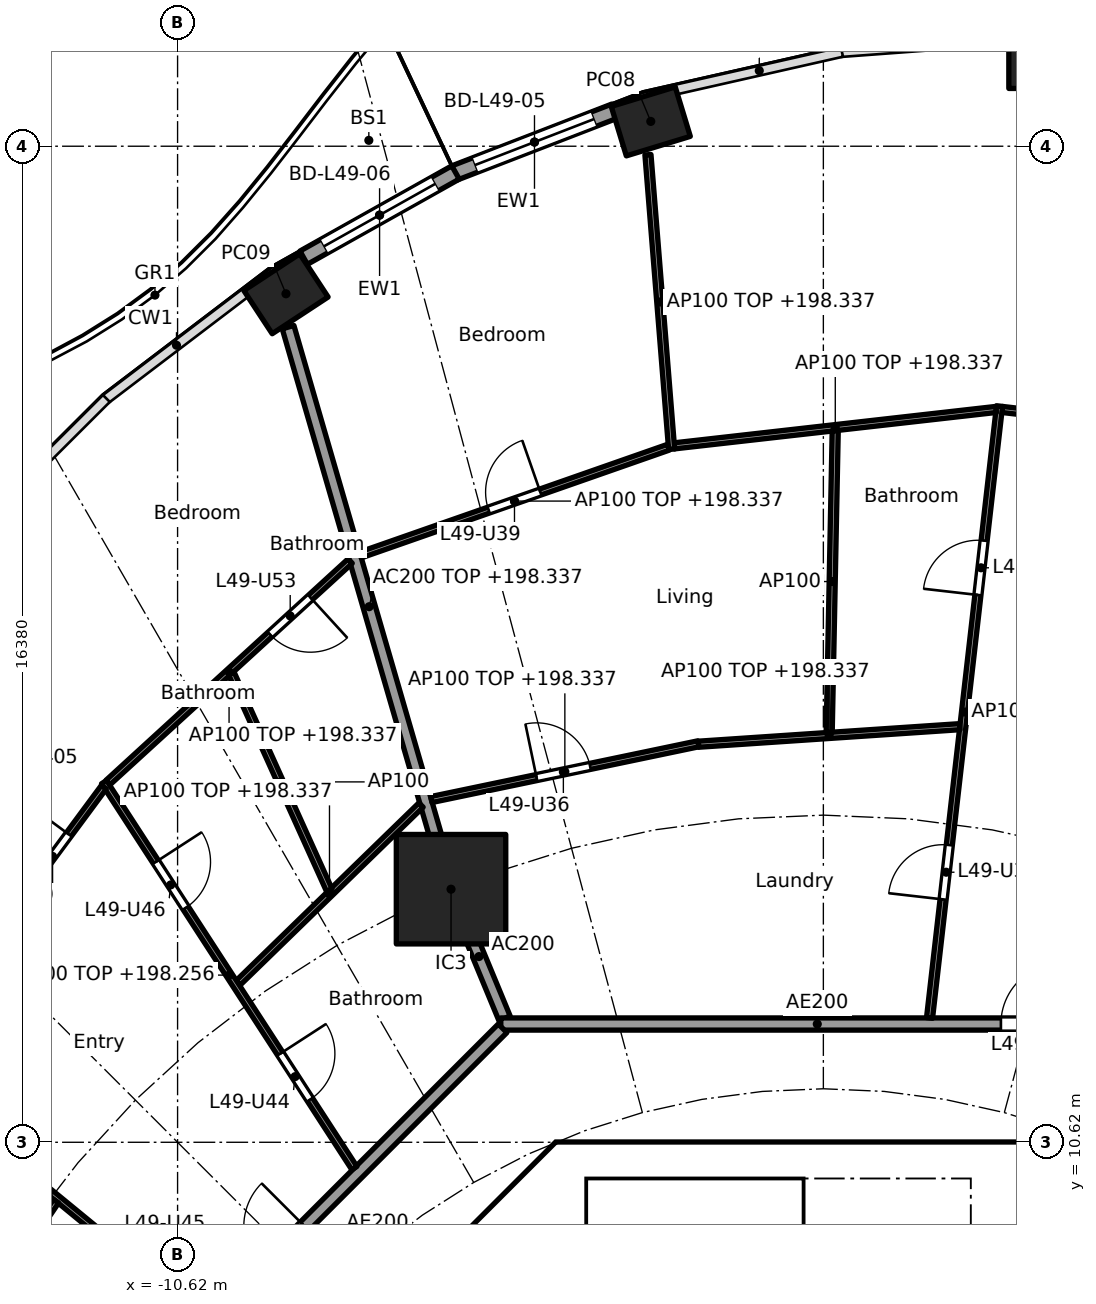
"""IFC4 building model, lengths in metres.
Left out: names, types, materials, properties, quantities, classifications, styles, units other than length and angle.
Written with IfcOpenShell. Run it as: python <this file> out.ifc"""

import sys

from ifc_helpers import new_model, si_unit, direction, frame, frame_2d, origin, origin_2d, place, context, subcontext, project, spatial, polyline, rectangle, hollow_rectangle, outline, extrude, element, fill, save


model = new_model("IFC4")
c1 = context("Model", 3, precision=1e-05, world=origin(), true_north=direction((0.0, 1.0)))
c2 = subcontext(c1, "Body", "Model", "MODEL_VIEW")
j1 = project(units=[si_unit("LENGTHUNIT", "METRE"), si_unit("PLANEANGLEUNIT", "RADIAN")], contexts=[c1])
p1 = place(None, origin())
s1 = spatial("IfcSite", under=j1, at=p1, CompositionType="ELEMENT")
p2 = place(p1, origin())
s2 = spatial("IfcBuilding", under=s1, at=p2, CompositionType="ELEMENT")
p3 = place(p2, frame((0.0, 0.0, 195.5)))
s3 = spatial("IfcBuildingStorey", under=s2, at=p3, CompositionType="ELEMENT", Elevation=195.5)
for number, where, z_axis, x_axis in (
    (1, (3.6, 28.375, 0.0), (0.0, 0.0, 1.0), (-1.0, 0.0, 0.0)),
    (2, (-2.838, 27.408, 0.0), (0.0, 0.0, 1.0), (-0.957, -0.292, 0.0)),
    (3, (-8.837, 24.573, 0.0), (0.0, 0.0, 1.0), (-0.836, -0.549, 0.0)),
):
    element("IfcColumn", number, at=place(p3, frame(where, z_axis=z_axis, x_axis=x_axis)), inside=s3, PredefinedType="COLUMN", context=c2, shape_type="SweptSolid", body=[
        extrude(hollow_rectangle(XDim=1.1, YDim=0.85, WallThickness=0.036, at=origin_2d()), origin(), (0.0, 0.0, 1.0), 3.7),
    ])
p4 = place(p3, frame((-6.123, 14.782, 0.0), z_axis=(0.0, 0.0, 1.0), x_axis=(1.0, 0.0, 0.0)))
e4 = element("IfcColumn", 4, at=p4, inside=s3, PredefinedType="COLUMN", context=c2, shape_type="SweptSolid", body=[
    extrude(rectangle(XDim=1.8, YDim=1.8, at=origin_2d()), origin(), (0.0, 0.0, 1.0), 3.7),
])
p5 = place(p3, frame((-6.065, 26.56, 0.0), z_axis=(0.0, 0.0, 1.0), x_axis=(0.932795487898, 0.360406128911, 0.0)))
e5 = element("IfcWall", 5, at=p5, inside=s3, PredefinedType="SOLIDWALL", context=c2, shape_type="SweptSolid", body=[
    extrude(rectangle(XDim=2.819, YDim=0.25, at=frame_2d((1.41, 0.0))), origin(), (0.0, 0.0, 1.0), 3.44),
])
p6 = place(p5, frame((0.36, 0.0, 0.0)))
e6 = element("IfcOpeningElement", 6, at=p6, cuts=e5, PredefinedType="OPENING", context=c2, shape_type="SweptSolid", body=[
    extrude(rectangle(XDim=2.1, YDim=2.4, at=frame_2d((1.05, 1.2))), frame((0.0, 0.135, 0.0), z_axis=(0.0, -1.0, 0.0), x_axis=(1.0, 0.0, 0.0)), (0.0, 0.0, 1.0), 0.27),
])
p7 = place(p3, frame((-8.547, 25.167, 0.0), z_axis=(0.0, 0.0, 1.0), x_axis=(0.872078262455, 0.489366431371, 0.0)))
e7 = element("IfcWall", 7, at=p7, inside=s3, PredefinedType="SOLIDWALL", context=c2, shape_type="SweptSolid", body=[
    extrude(rectangle(XDim=2.864, YDim=0.25, at=frame_2d((1.432, 0.0))), origin(), (0.0, 0.0, 1.0), 3.44),
])
p8 = place(p7, frame((0.382, 0.0, 0.0)))
e8 = element("IfcOpeningElement", 8, at=p8, cuts=e7, PredefinedType="OPENING", context=c2, shape_type="SweptSolid", body=[
    extrude(rectangle(XDim=2.1, YDim=2.4, at=frame_2d((1.05, 1.2))), frame((0.0, 0.135, 0.0), z_axis=(0.0, -1.0, 0.0), x_axis=(1.0, 0.0, 0.0)), (0.0, 0.0, 1.0), 0.27),
])
p9 = place(p3, frame((-4.613, 9.988, 0.0), z_axis=(0.0, 0.0, 1.0), x_axis=(-0.707106781187, -0.707106781187, 0.0)))
e9 = element("IfcWall", 9, at=p9, inside=s3, PredefinedType="SHEAR", context=c2, shape_type="SweptSolid", body=[
    extrude(rectangle(XDim=7.602, YDim=0.6, at=frame_2d((3.801, 0.0))), origin(), (0.0, 0.0, 1.0), 3.44),
])
p10 = place(p9, frame((0.351, 0.0, 0.0)))
e10 = element("IfcOpeningElement", 10, at=p10, cuts=e9, PredefinedType="OPENING", context=c2, shape_type="SweptSolid", body=[
    extrude(rectangle(XDim=1.1, YDim=2.1, at=frame_2d((0.55, 1.05))), frame((0.0, 0.31, 0.0), z_axis=(0.0, -1.0, 0.0), x_axis=(1.0, 0.0, 0.0)), (0.0, 0.0, 1.0), 0.62),
])
p11 = place(p3, origin())
e11 = element("IfcWall", 11, at=p11, inside=s3, PredefinedType="SHEAR", context=c2, shape_type="SweptSolid", body=[
    extrude(outline(polyline([(-4.152, 10.025), (-4.401, 9.776), (-4.825, 10.2), (-4.401, 10.625), (4.401, 10.625), (4.825, 10.2), (4.401, 9.776), (4.152, 10.025), (-4.152, 10.025)])), origin(), (0.0, 0.0, 1.0), 3.44),
])
p12 = place(p3, origin())
e12 = element("IfcWall", 12, at=p12, inside=s3, PredefinedType="SOLIDWALL", context=c2, shape_type="SweptSolid", body=[
    extrude(outline(polyline([(-3.9, 7.025), (-4.1, 7.025), (-4.1, 10.025), (-3.9, 10.025), (-3.9, 7.025)])), origin(), (0.0, 0.0, 1.0), 3.44),
])
p13 = place(p3, frame((-5.243, 12.657, 0.0), z_axis=(0.0, 0.0, 1.0), x_axis=(-0.382707856524, 0.923869415315, 0.0)))
e13 = element("IfcWall", 13, at=p13, inside=s3, PredefinedType="PARTITIONING", context=c2, shape_type="SweptSolid", body=[
    extrude(rectangle(XDim=2.2, YDim=0.2, at=frame_2d((1.1, 0.0))), origin(), (0.0, 0.0, 1.0), 3.44),
])
p14 = place(p3, frame((-6.137, 14.83, 0.0), z_axis=(0.0, 0.0, 1.0), x_axis=(-0.278461169897, 0.96044748782, 0.0)))
e14 = element("IfcWall", 14, at=p14, inside=s3, PredefinedType="PARTITIONING", context=c2, shape_type="SweptSolid", body=[
    extrude(rectangle(XDim=9.573, YDim=0.2, at=frame_2d((4.787, 0.0))), origin(), (0.0, 0.0, 1.0), 2.837),
])
p15 = place(p3, frame((5.104, 12.565, 0.0), z_axis=(0.0, 0.0, 1.0), x_axis=(-1.0, 0.0, 0.0)))
e15 = element("IfcWall", 15, at=p15, inside=s3, PredefinedType="PARTITIONING", context=c2, shape_type="SweptSolid", body=[
    extrude(rectangle(XDim=10.409, YDim=0.2, at=frame_2d((5.205, 0.0))), origin(), (0.0, 0.0, 1.0), 3.44),
])
p16 = place(p15, frame((1.185, 0.0, 0.0)))
e16 = element("IfcOpeningElement", 16, at=p16, cuts=e15, PredefinedType="OPENING", context=c2, shape_type="SweptSolid", body=[
    extrude(rectangle(XDim=1.0, YDim=2.1, at=frame_2d((0.5, 1.05))), frame((0.0, 0.11, 0.0), z_axis=(0.0, -1.0, 0.0), x_axis=(1.0, 0.0, 0.0)), (0.0, 0.0, 1.0), 0.22),
])
p17 = place(p3, frame((-5.275, 12.494, 0.0), z_axis=(0.0, 0.0, 1.0), x_axis=(-0.707106781187, -0.707106781187, 0.0)))
e17 = element("IfcWall", 17, at=p17, inside=s3, PredefinedType="PARTITIONING", context=c2, shape_type="SweptSolid", body=[
    extrude(rectangle(XDim=10.209, YDim=0.2, at=frame_2d((5.104, 0.0))), origin(), (0.0, 0.0, 1.0), 3.44),
])
p18 = place(p17, frame((4.604, 0.0, 0.0)))
e18 = element("IfcOpeningElement", 18, at=p18, cuts=e17, PredefinedType="OPENING", context=c2, shape_type="SweptSolid", body=[
    extrude(rectangle(XDim=1.0, YDim=2.1, at=frame_2d((0.5, 1.05))), frame((0.0, 0.11, 0.0), z_axis=(0.0, -1.0, 0.0), x_axis=(1.0, 0.0, 0.0)), (0.0, 0.0, 1.0), 0.22),
])
p19 = place(p3, frame((8.312, 22.044, 0.0), z_axis=(0.0, 0.0, 1.0), x_axis=(-0.993245806382, 0.1160291692, 0.0)))
e19 = element("IfcWall", 19, at=p19, inside=s3, PredefinedType="PARTITIONING", context=c2, shape_type="SweptSolid", body=[
    extrude(rectangle(XDim=5.408, YDim=0.1, at=frame_2d((2.704, 0.0))), origin(), (0.0, 0.0, 1.0), 2.837),
])
p20 = place(p19, frame((2.254, 0.0, 0.0)))
e20 = element("IfcOpeningElement", 20, at=p20, cuts=e19, PredefinedType="OPENING", context=c2, shape_type="SweptSolid", body=[
    extrude(rectangle(XDim=0.9, YDim=2.1, at=frame_2d((0.45, 1.05))), frame((0.0, 0.06, 0.0), z_axis=(0.0, -1.0, 0.0), x_axis=(1.0, 0.0, 0.0)), (0.0, 0.0, 1.0), 0.12),
])
p21 = place(p3, frame((1.746, 12.664, 0.0), z_axis=(0.0, 0.0, 1.0), x_axis=(0.113629529561, 0.993523190475, 0.0)))
e21 = element("IfcWall", 21, at=p21, inside=s3, PredefinedType="PARTITIONING", context=c2, shape_type="SweptSolid", body=[
    extrude(rectangle(XDim=10.128, YDim=0.1, at=frame_2d((5.064, 0.0))), origin(), (0.0, 0.0, 1.0), 2.756),
])
p22 = place(p21, frame((1.962, 0.0, 0.0)))
e22 = element("IfcOpeningElement", 22, at=p22, cuts=e21, PredefinedType="OPENING", context=c2, shape_type="SweptSolid", body=[
    extrude(rectangle(XDim=0.9, YDim=2.1, at=frame_2d((0.45, 1.05))), frame((0.0, 0.06, 0.0), z_axis=(0.0, -1.0, 0.0), x_axis=(1.0, 0.0, 0.0)), (0.0, 0.0, 1.0), 0.12),
])
p23 = place(p21, frame((7.002, 0.0, 0.0)))
e23 = element("IfcOpeningElement", 23, at=p23, cuts=e21, PredefinedType="OPENING", context=c2, shape_type="SweptSolid", body=[
    extrude(rectangle(XDim=0.9, YDim=2.1, at=frame_2d((0.45, 1.05))), frame((0.0, 0.06, 0.0), z_axis=(0.0, -1.0, 0.0), x_axis=(1.0, 0.0, 0.0)), (0.0, 0.0, 1.0), 0.12),
])
p24 = place(p3, frame((2.244, 17.455, 0.0), z_axis=(0.0, 0.0, 1.0), x_axis=(-0.997754717554, -0.066974051687, 0.0)))
e24 = element("IfcWall", 24, at=p24, inside=s3, PredefinedType="PARTITIONING", context=c2, shape_type="SweptSolid", body=[
    extrude(rectangle(XDim=4.309, YDim=0.1, at=frame_2d((2.154, 0.0))), origin(), (0.0, 0.0, 1.0), 2.837),
])
p25 = place(p3, frame((2.842, 22.671, 0.0), z_axis=(0.0, 0.0, 1.0), x_axis=(-0.993660315081, -0.112424099879, 0.0)))
e25 = element("IfcWall", 25, at=p25, inside=s3, PredefinedType="PARTITIONING", context=c2, shape_type="SweptSolid", body=[
    extrude(rectangle(XDim=5.325, YDim=0.1, at=frame_2d((2.662, 0.0))), origin(), (0.0, 0.0, 1.0), 2.837),
])
p26 = place(p3, frame((0.096, 17.36, 0.0), z_axis=(0.0, 0.0, 1.0), x_axis=(0.019973380305, 0.999800512142, 0.0)))
e26 = element("IfcWall", 26, at=p26, inside=s3, PredefinedType="PARTITIONING", context=c2, shape_type="SweptSolid", body=[
    extrude(rectangle(XDim=4.963, YDim=0.1, at=frame_2d((2.481, 0.0))), origin(), (0.0, 0.0, 1.0), 3.44),
])
p27 = place(p3, frame((-2.056, 17.173, 0.0), z_axis=(0.0, 0.0, 1.0), x_axis=(-0.978902917122, -0.20432591331, 0.0)))
e27 = element("IfcWall", 27, at=p27, inside=s3, PredefinedType="PARTITIONING", context=c2, shape_type="SweptSolid", body=[
    extrude(rectangle(XDim=4.486, YDim=0.1, at=frame_2d((2.243, 0.0))), origin(), (0.0, 0.0, 1.0), 2.837),
])
p28 = place(p27, frame((1.818, 0.0, 0.0)))
e28 = element("IfcOpeningElement", 28, at=p28, cuts=e27, PredefinedType="OPENING", context=c2, shape_type="SweptSolid", body=[
    extrude(rectangle(XDim=0.9, YDim=2.1, at=frame_2d((0.45, 1.05))), frame((0.0, 0.06, 0.0), z_axis=(0.0, -1.0, 0.0), x_axis=(1.0, 0.0, 0.0)), (0.0, 0.0, 1.0), 0.12),
])
p29 = place(p3, frame((-2.495, 22.017, 0.0), z_axis=(0.0, 0.0, 1.0), x_axis=(-0.080150660566, 0.99678276049, 0.0)))
e29 = element("IfcWall", 29, at=p29, inside=s3, PredefinedType="PARTITIONING", context=c2, shape_type="SweptSolid", body=[
    extrude(rectangle(XDim=4.858, YDim=0.1, at=frame_2d((2.429, 0.0))), origin(), (0.0, 0.0, 1.0), 2.837),
])
p30 = place(p3, frame((-2.546, 22.051, 0.0), z_axis=(0.0, 0.0, 1.0), x_axis=(-0.94391294884, -0.330194404878, 0.0)))
e30 = element("IfcWall", 30, at=p30, inside=s3, PredefinedType="PARTITIONING", context=c2, shape_type="SweptSolid", body=[
    extrude(rectangle(XDim=5.367, YDim=0.1, at=frame_2d((2.684, 0.0))), origin(), (0.0, 0.0, 1.0), 2.837),
])
p31 = place(p30, frame((2.234, 0.0, 0.0)))
e31 = element("IfcOpeningElement", 31, at=p31, cuts=e30, PredefinedType="OPENING", context=c2, shape_type="SweptSolid", body=[
    extrude(rectangle(XDim=0.9, YDim=2.1, at=frame_2d((0.45, 1.05))), frame((0.0, 0.06, 0.0), z_axis=(0.0, -1.0, 0.0), x_axis=(1.0, 0.0, 0.0)), (0.0, 0.0, 1.0), 0.12),
])
p32 = place(p3, frame((-6.616, 16.166, 0.0), z_axis=(0.0, 0.0, 1.0), x_axis=(-0.716919058692, -0.697156412352, 0.0)))
e32 = element("IfcWall", 32, at=p32, inside=s3, PredefinedType="PARTITIONING", context=c2, shape_type="SweptSolid", body=[
    extrude(rectangle(XDim=4.2, YDim=0.1, at=frame_2d((2.1, 0.0))), origin(), (0.0, 0.0, 1.0), 2.837),
])
p33 = place(p3, frame((-7.781, 20.178, 0.0), z_axis=(0.0, 0.0, 1.0), x_axis=(-0.73807320557, -0.674720640872, 0.0)))
e33 = element("IfcWall", 33, at=p33, inside=s3, PredefinedType="PARTITIONING", context=c2, shape_type="SweptSolid", body=[
    extrude(rectangle(XDim=5.399, YDim=0.1, at=frame_2d((2.699, 0.0))), origin(), (0.0, 0.0, 1.0), 2.837),
])
p34 = place(p33, frame((0.887, 0.0, 0.0)))
e34 = element("IfcOpeningElement", 34, at=p34, cuts=e33, PredefinedType="OPENING", context=c2, shape_type="SweptSolid", body=[
    extrude(rectangle(XDim=0.9, YDim=2.1, at=frame_2d((0.45, 1.05))), frame((0.0, 0.06, 0.0), z_axis=(0.0, -1.0, 0.0), x_axis=(1.0, 0.0, 0.0)), (0.0, 0.0, 1.0), 0.12),
])
p35 = place(p3, frame((-8.125, 14.765, 0.0), z_axis=(0.0, 0.0, 1.0), x_axis=(-0.411745679848, 0.911298795745, 0.0)))
e35 = element("IfcWall", 35, at=p35, inside=s3, PredefinedType="PARTITIONING", context=c2, shape_type="SweptSolid", body=[
    extrude(rectangle(XDim=3.909, YDim=0.1, at=frame_2d((1.955, 0.0))), origin(), (0.0, 0.0, 1.0), 3.44),
])
p36 = place(p3, frame((-7.712, 10.195, 0.0), z_axis=(0.0, 0.0, 1.0), x_axis=(-0.544179442551, 0.838968851809, 0.0)))
e36 = element("IfcWall", 36, at=p36, inside=s3, PredefinedType="PARTITIONING", context=c2, shape_type="SweptSolid", body=[
    extrude(rectangle(XDim=7.566, YDim=0.1, at=frame_2d((3.783, 0.0))), origin(), (0.0, 0.0, 1.0), 2.756),
])
p37 = place(p36, frame((1.343, 0.0, 0.0)))
e37 = element("IfcOpeningElement", 37, at=p37, cuts=e36, PredefinedType="OPENING", context=c2, shape_type="SweptSolid", body=[
    extrude(rectangle(XDim=0.9, YDim=2.1, at=frame_2d((0.45, 1.05))), frame((0.0, 0.06, 0.0), z_axis=(0.0, -1.0, 0.0), x_axis=(1.0, 0.0, 0.0)), (0.0, 0.0, 1.0), 0.12),
])
p38 = place(p36, frame((5.101, 0.0, 0.0)))
e38 = element("IfcOpeningElement", 38, at=p38, cuts=e36, PredefinedType="OPENING", context=c2, shape_type="SweptSolid", body=[
    extrude(rectangle(XDim=0.9, YDim=2.1, at=frame_2d((0.45, 1.05))), frame((0.0, 0.06, 0.0), z_axis=(0.0, -1.0, 0.0), x_axis=(1.0, 0.0, 0.0)), (0.0, 0.0, 1.0), 0.12),
])
p39 = place(p3, frame((-11.832, 16.461, 0.0), z_axis=(0.0, 0.0, 1.0), x_axis=(-0.594704483906, -0.803944386647, 0.0)))
e39 = element("IfcWall", 39, at=p39, inside=s3, PredefinedType="PARTITIONING", context=c2, shape_type="SweptSolid", body=[
    extrude(rectangle(XDim=5.672, YDim=0.1, at=frame_2d((2.836, 0.0))), origin(), (0.0, 0.0, 1.0), 2.837),
])
p40 = place(p39, frame((0.968, 0.0, 0.0)))
e40 = element("IfcOpeningElement", 40, at=p40, cuts=e39, PredefinedType="OPENING", context=c2, shape_type="SweptSolid", body=[
    extrude(rectangle(XDim=0.9, YDim=2.1, at=frame_2d((0.45, 1.05))), frame((0.0, 0.06, 0.0), z_axis=(0.0, -1.0, 0.0), x_axis=(1.0, 0.0, 0.0)), (0.0, 0.0, 1.0), 0.12),
])
p41 = place(p39, frame((3.804, 0.0, 0.0)))
e41 = element("IfcOpeningElement", 41, at=p41, cuts=e39, PredefinedType="OPENING", context=c2, shape_type="SweptSolid", body=[
    extrude(rectangle(XDim=0.9, YDim=2.1, at=frame_2d((0.45, 1.05))), frame((0.0, 0.06, 0.0), z_axis=(0.0, -1.0, 0.0), x_axis=(1.0, 0.0, 0.0)), (0.0, 0.0, 1.0), 0.12),
])
p42 = place(p3, frame((-10.189, 7.721, 0.0), z_axis=(0.0, 0.0, 1.0), x_axis=(-0.773121441079, 0.634258021112, 0.0)))
e42 = element("IfcWall", 42, at=p42, inside=s3, PredefinedType="PARTITIONING", context=c2, shape_type="SweptSolid", body=[
    extrude(rectangle(XDim=6.577, YDim=0.1, at=frame_2d((3.289, 0.0))), origin(), (0.0, 0.0, 1.0), 2.756),
])
p43 = place(p42, frame((1.104, 0.0, 0.0)))
e43 = element("IfcOpeningElement", 43, at=p43, cuts=e42, PredefinedType="OPENING", context=c2, shape_type="SweptSolid", body=[
    extrude(rectangle(XDim=0.9, YDim=2.1, at=frame_2d((0.45, 1.05))), frame((0.0, 0.06, 0.0), z_axis=(0.0, -1.0, 0.0), x_axis=(1.0, 0.0, 0.0)), (0.0, 0.0, 1.0), 0.12),
])
p44 = place(p42, frame((4.367, 0.0, 0.0)))
e44 = element("IfcOpeningElement", 44, at=p44, cuts=e42, PredefinedType="OPENING", context=c2, shape_type="SweptSolid", body=[
    extrude(rectangle(XDim=0.9, YDim=2.1, at=frame_2d((0.45, 1.05))), frame((0.0, 0.06, 0.0), z_axis=(0.0, -1.0, 0.0), x_axis=(1.0, 0.0, 0.0)), (0.0, 0.0, 1.0), 0.12),
])
p45 = place(p3, frame((-12.619, 9.65, 0.0), z_axis=(0.0, 0.0, 1.0), x_axis=(-0.561064907171, -0.827771810308, 0.0)))
e45 = element("IfcWall", 45, at=p45, inside=s3, PredefinedType="PARTITIONING", context=c2, shape_type="SweptSolid", body=[
    extrude(rectangle(XDim=4.159, YDim=0.1, at=frame_2d((2.079, 0.0))), origin(), (0.0, 0.0, 1.0), 3.44),
])
p46 = place(p6, origin())
e46 = element("IfcDoor", 46, at=p46, inside=s3, OperationType="SLIDING_TO_LEFT", PredefinedType="DOOR", context=c2, shape_type="SweptSolid", body=[
    extrude(rectangle(XDim=2.1, YDim=2.4, at=frame_2d((1.05, 1.2))), frame((0.0, 0.025, 0.0), z_axis=(0.0, -1.0, 0.0), x_axis=(1.0, 0.0, 0.0)), (0.0, 0.0, 1.0), 0.05),
])
fill(e6, e46)
p47 = place(p8, origin())
e47 = element("IfcDoor", 47, at=p47, inside=s3, OperationType="SLIDING_TO_LEFT", PredefinedType="DOOR", context=c2, shape_type="SweptSolid", body=[
    extrude(rectangle(XDim=2.1, YDim=2.4, at=frame_2d((1.05, 1.2))), frame((0.0, 0.025, 0.0), z_axis=(0.0, -1.0, 0.0), x_axis=(1.0, 0.0, 0.0)), (0.0, 0.0, 1.0), 0.05),
])
fill(e8, e47)
p48 = place(p10, origin())
e48 = element("IfcDoor", 48, at=p48, inside=s3, OperationType="SINGLE_SWING_RIGHT", PredefinedType="DOOR", context=c2, shape_type="SweptSolid", body=[
    extrude(rectangle(XDim=1.1, YDim=2.1, at=frame_2d((0.55, 1.05))), frame((0.0, 0.025, 0.0), z_axis=(0.0, -1.0, 0.0), x_axis=(1.0, 0.0, 0.0)), (0.0, 0.0, 1.0), 0.05),
])
fill(e10, e48)
p49 = place(p16, frame((1.0, 0.0, 0.0), x_axis=(-1.0, 0.0, 0.0)))
e49 = element("IfcDoor", 49, at=p49, inside=s3, OperationType="SINGLE_SWING_RIGHT", PredefinedType="DOOR", context=c2, shape_type="SweptSolid", body=[
    extrude(rectangle(XDim=1.0, YDim=2.1, at=frame_2d((0.5, 1.05))), frame((0.0, 0.025, 0.0), z_axis=(0.0, -1.0, 0.0), x_axis=(1.0, 0.0, 0.0)), (0.0, 0.0, 1.0), 0.05),
])
fill(e16, e49)
p50 = place(p22, origin())
e50 = element("IfcDoor", 50, at=p50, inside=s3, OperationType="SINGLE_SWING_LEFT", PredefinedType="DOOR", context=c2, shape_type="SweptSolid", body=[
    extrude(rectangle(XDim=0.9, YDim=2.1, at=frame_2d((0.45, 1.05))), frame((0.0, 0.025, 0.0), z_axis=(0.0, -1.0, 0.0), x_axis=(1.0, 0.0, 0.0)), (0.0, 0.0, 1.0), 0.05),
])
fill(e22, e50)
p51 = place(p23, origin())
e51 = element("IfcDoor", 51, at=p51, inside=s3, OperationType="SINGLE_SWING_LEFT", PredefinedType="DOOR", context=c2, shape_type="SweptSolid", body=[
    extrude(rectangle(XDim=0.9, YDim=2.1, at=frame_2d((0.45, 1.05))), frame((0.0, 0.025, 0.0), z_axis=(0.0, -1.0, 0.0), x_axis=(1.0, 0.0, 0.0)), (0.0, 0.0, 1.0), 0.05),
])
fill(e23, e51)
p52 = place(p28, frame((0.9, 0.0, 0.0), x_axis=(-1.0, 0.0, 0.0)))
e52 = element("IfcDoor", 52, at=p52, inside=s3, OperationType="SINGLE_SWING_LEFT", PredefinedType="DOOR", context=c2, shape_type="SweptSolid", body=[
    extrude(rectangle(XDim=0.9, YDim=2.1, at=frame_2d((0.45, 1.05))), frame((0.0, 0.025, 0.0), z_axis=(0.0, -1.0, 0.0), x_axis=(1.0, 0.0, 0.0)), (0.0, 0.0, 1.0), 0.05),
])
fill(e28, e52)
p53 = place(p31, frame((0.9, 0.0, 0.0), x_axis=(-1.0, 0.0, 0.0)))
e53 = element("IfcDoor", 53, at=p53, inside=s3, OperationType="SINGLE_SWING_RIGHT", PredefinedType="DOOR", context=c2, shape_type="SweptSolid", body=[
    extrude(rectangle(XDim=0.9, YDim=2.1, at=frame_2d((0.45, 1.05))), frame((0.0, 0.025, 0.0), z_axis=(0.0, -1.0, 0.0), x_axis=(1.0, 0.0, 0.0)), (0.0, 0.0, 1.0), 0.05),
])
fill(e31, e53)
p54 = place(p37, frame((0.9, 0.0, 0.0), x_axis=(-1.0, 0.0, 0.0)))
e54 = element("IfcDoor", 54, at=p54, inside=s3, OperationType="SINGLE_SWING_LEFT", PredefinedType="DOOR", context=c2, shape_type="SweptSolid", body=[
    extrude(rectangle(XDim=0.9, YDim=2.1, at=frame_2d((0.45, 1.05))), frame((0.0, 0.025, 0.0), z_axis=(0.0, -1.0, 0.0), x_axis=(1.0, 0.0, 0.0)), (0.0, 0.0, 1.0), 0.05),
])
fill(e37, e54)
p55 = place(p38, frame((0.9, 0.0, 0.0), x_axis=(-1.0, 0.0, 0.0)))
e55 = element("IfcDoor", 55, at=p55, inside=s3, OperationType="SINGLE_SWING_LEFT", PredefinedType="DOOR", context=c2, shape_type="SweptSolid", body=[
    extrude(rectangle(XDim=0.9, YDim=2.1, at=frame_2d((0.45, 1.05))), frame((0.0, 0.025, 0.0), z_axis=(0.0, -1.0, 0.0), x_axis=(1.0, 0.0, 0.0)), (0.0, 0.0, 1.0), 0.05),
])
fill(e38, e55)
p56 = place(p40, frame((0.9, 0.0, 0.0), x_axis=(-1.0, 0.0, 0.0)))
e56 = element("IfcDoor", 56, at=p56, inside=s3, OperationType="SINGLE_SWING_RIGHT", PredefinedType="DOOR", context=c2, shape_type="SweptSolid", body=[
    extrude(rectangle(XDim=0.9, YDim=2.1, at=frame_2d((0.45, 1.05))), frame((0.0, 0.025, 0.0), z_axis=(0.0, -1.0, 0.0), x_axis=(1.0, 0.0, 0.0)), (0.0, 0.0, 1.0), 0.05),
])
fill(e40, e56)
p57 = place(p34, origin())
e57 = element("IfcDoor", 57, at=p57, inside=s3, OperationType="SINGLE_SWING_LEFT", PredefinedType="DOOR", context=c2, shape_type="SweptSolid", body=[
    extrude(rectangle(XDim=0.9, YDim=2.1, at=frame_2d((0.45, 1.05))), frame((0.0, 0.025, 0.0), z_axis=(0.0, -1.0, 0.0), x_axis=(1.0, 0.0, 0.0)), (0.0, 0.0, 1.0), 0.05),
])
fill(e34, e57)
save(model, sys.argv[1])
